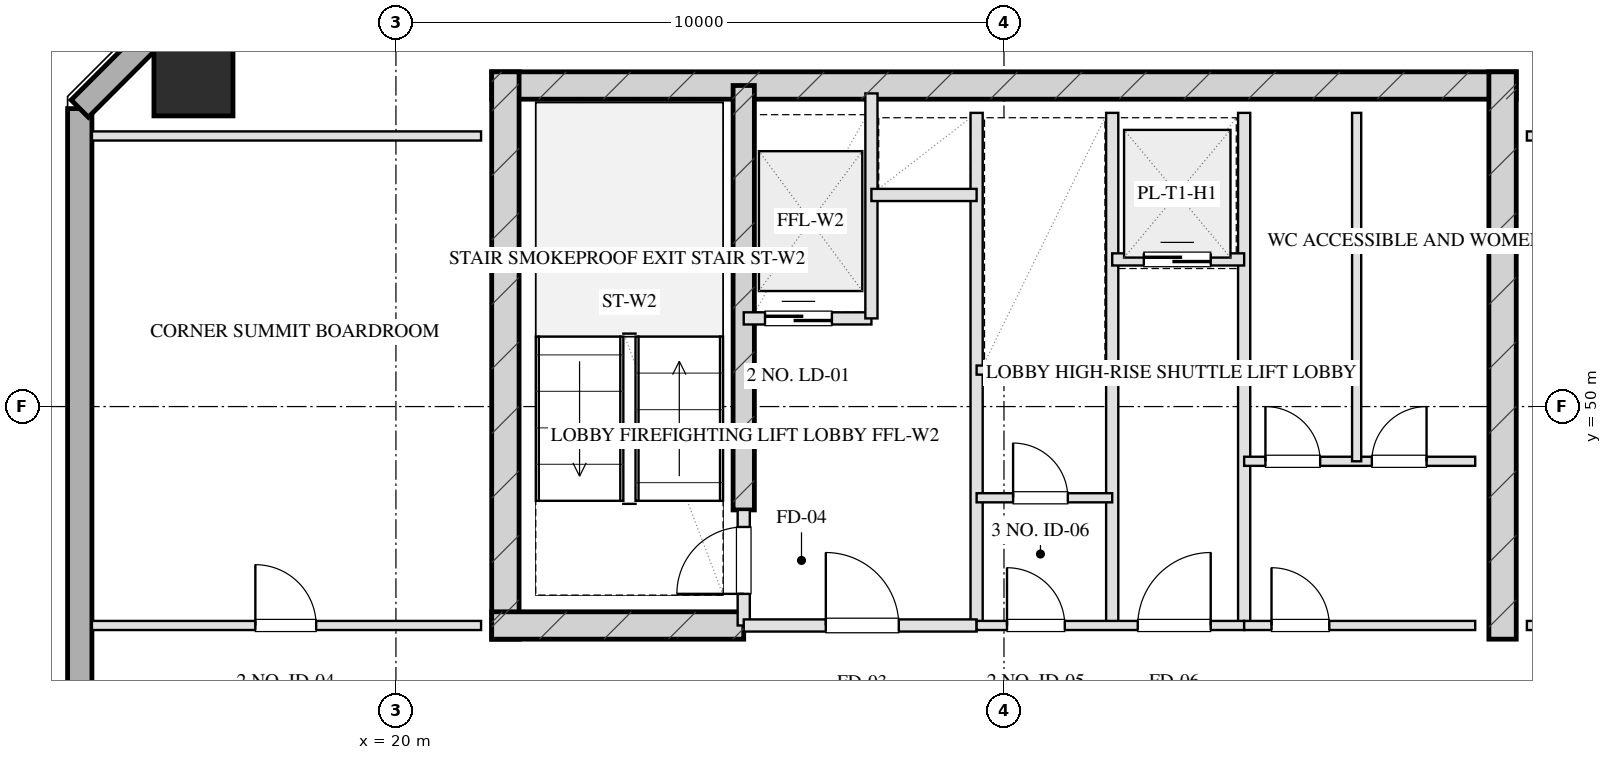
"""IFC4 building model, lengths in metres.
Left out: names, types, materials, properties, quantities, classifications, styles, units other than length and angle.
Written with IfcOpenShell. Run it as: python <this file> out.ifc"""

import sys

from ifc_helpers import new_model, si_unit, direction, frame, frame_2d, origin, origin_2d, place, context, subcontext, project, spatial, rectangle, hollow_rectangle, extrude, element, fill, save


model = new_model("IFC4")
c1 = context("Model", 3, precision=1e-05, world=origin(), true_north=direction((0.0, 1.0)))
c2 = subcontext(c1, "Body", "Model", "MODEL_VIEW")
j1 = project(units=[si_unit("LENGTHUNIT", "METRE"), si_unit("PLANEANGLEUNIT", "RADIAN")], contexts=[c1])
p1 = place(None, origin())
s1 = spatial("IfcSite", under=j1, at=p1, CompositionType="ELEMENT")
p2 = place(p1, origin())
s2 = spatial("IfcBuilding", under=s1, at=p2, CompositionType="ELEMENT")
p3 = place(p2, frame((0.0, 0.0, 272.8)))
s3 = spatial("IfcBuildingStorey", under=s2, at=p3, CompositionType="ELEMENT", Elevation=272.8)
p4 = place(p3, frame((21.575, 55.28, 0.0), z_axis=(0.0, 0.0, 1.0), x_axis=(1.0, 0.0, 0.0)))
e1 = element("IfcWall", 1, at=p4, inside=s3, PredefinedType="SHEAR", context=c2, shape_type="SweptSolid", body=[
    extrude(rectangle(XDim=16.85, YDim=0.45, at=frame_2d((8.425, 0.0))), origin(), (0.0, 0.0, 1.0), 3.2),
])
for number, where, z_axis, x_axis in (
    (2, (21.8, 46.175, 0.0), (0.0, 0.0, 1.0), (0.0, 1.0, 0.0)),
    (3, (38.2, 46.175, 0.0), (0.0, 0.0, 1.0), (0.0, 1.0, 0.0)),
):
    element("IfcWall", number, at=place(p3, frame(where, z_axis=z_axis, x_axis=x_axis)), inside=s3, PredefinedType="SHEAR", context=c2, shape_type="SweptSolid", body=[
        extrude(rectangle(XDim=9.33, YDim=0.45, at=frame_2d((4.665, 0.0))), origin(), (0.0, 0.0, 1.0), 3.2),
    ])
p5 = place(p3, frame((25.72, 48.3, 0.0), z_axis=(0.0, 0.0, 1.0), x_axis=(0.0, 1.0, 0.0)))
e4 = element("IfcWall", 4, at=p5, inside=s3, PredefinedType="SHEAR", context=c2, shape_type="SweptSolid", body=[
    extrude(rectangle(XDim=6.98, YDim=0.35, at=frame_2d((3.49, 0.0))), origin(), (0.0, 0.0, 1.0), 3.2),
])
p6 = place(p3, frame((21.575, 46.4, 0.0), z_axis=(0.0, 0.0, 1.0), x_axis=(1.0, 0.0, 0.0)))
e5 = element("IfcWall", 5, at=p6, inside=s3, PredefinedType="SHEAR", context=c2, shape_type="SweptSolid", body=[
    extrude(rectangle(XDim=4.145, YDim=0.45, at=frame_2d((2.073, 0.0))), origin(), (0.0, 0.0, 1.0), 3.2),
])
p7 = place(p3, frame((16.67, 55.43, 0.0), z_axis=(0.0, 0.0, 1.0), x_axis=(1.0, 0.0, 0.0)))
e6 = element("IfcColumn", 6, at=p7, inside=s3, PredefinedType="COLUMN", context=c2, shape_type="SweptSolid", body=[
    extrude(hollow_rectangle(XDim=1.3, YDim=1.3, WallThickness=0.045, at=origin_2d()), origin(), (0.0, 0.0, 1.0), 3.201),
])
p8 = place(p3, frame((14.8, 13.1, 0.0), z_axis=(0.0, 0.0, 1.0), x_axis=(0.0, 1.0, 0.0)))
e7 = element("IfcWall", 7, at=p8, inside=s3, PredefinedType="SOLIDWALL", context=c2, shape_type="SweptSolid", body=[
    extrude(rectangle(XDim=41.8, YDim=0.4, at=frame_2d((20.9, 0.0))), origin(), (0.0, 0.0, 1.0), 2.36),
])
p9 = place(p8, frame((13.525, 0.0, 0.75)))
e8 = element("IfcOpeningElement", 8, at=p9, cuts=e7, PredefinedType="OPENING", context=c2, shape_type="SweptSolid", body=[
    extrude(rectangle(XDim=1.95, YDim=1.21, at=frame_2d((0.975, 0.605))), frame((0.0, 0.21, 0.0), z_axis=(0.0, -1.0, 0.0), x_axis=(1.0, 0.0, 0.0)), (0.0, 0.0, 1.0), 0.42),
])
p10 = place(p8, frame((17.325, 0.0, 0.75)))
e9 = element("IfcOpeningElement", 9, at=p10, cuts=e7, PredefinedType="OPENING", context=c2, shape_type="SweptSolid", body=[
    extrude(rectangle(XDim=1.95, YDim=1.21, at=frame_2d((0.975, 0.605))), frame((0.0, 0.21, 0.0), z_axis=(0.0, -1.0, 0.0), x_axis=(1.0, 0.0, 0.0)), (0.0, 0.0, 1.0), 0.42),
])
p11 = place(p8, frame((22.525, 0.0, 0.75)))
e10 = element("IfcOpeningElement", 10, at=p11, cuts=e7, PredefinedType="OPENING", context=c2, shape_type="SweptSolid", body=[
    extrude(rectangle(XDim=1.95, YDim=1.21, at=frame_2d((0.975, 0.605))), frame((0.0, 0.21, 0.0), z_axis=(0.0, -1.0, 0.0), x_axis=(1.0, 0.0, 0.0)), (0.0, 0.0, 1.0), 0.42),
])
p12 = place(p8, frame((26.325, 0.0, 0.75)))
e11 = element("IfcOpeningElement", 11, at=p12, cuts=e7, PredefinedType="OPENING", context=c2, shape_type="SweptSolid", body=[
    extrude(rectangle(XDim=1.95, YDim=1.21, at=frame_2d((0.975, 0.605))), frame((0.0, 0.21, 0.0), z_axis=(0.0, -1.0, 0.0), x_axis=(1.0, 0.0, 0.0)), (0.0, 0.0, 1.0), 0.42),
])
p13 = place(p3, frame((14.8, 54.9, 0.0), z_axis=(0.0, 0.0, 1.0), x_axis=(0.707070815327, 0.707142745217, 0.0)))
e12 = element("IfcWall", 12, at=p13, inside=s3, PredefinedType="SOLIDWALL", context=c2, shape_type="SweptSolid", body=[
    extrude(rectangle(XDim=3.394, YDim=0.4, at=frame_2d((1.697, 0.0))), origin(), (0.0, 0.0, 1.0), 2.36),
])
p14 = place(p3, frame((25.72, 46.4, 0.0), z_axis=(0.0, 0.0, 1.0), x_axis=(0.0, 1.0, 0.0)))
e13 = element("IfcWall", 13, at=p14, inside=s3, PredefinedType="PARTITIONING", context=c2, shape_type="SweptSolid", body=[
    extrude(rectangle(XDim=1.9, YDim=0.2, at=frame_2d((0.95, 0.0))), origin(), (0.0, 0.0, 1.0), 2.925),
])
p15 = place(p14, frame((0.52, 0.0, 0.0)))
e14 = element("IfcOpeningElement", 14, at=p15, cuts=e13, PredefinedType="OPENING", context=c2, shape_type="SweptSolid", body=[
    extrude(rectangle(XDim=1.1, YDim=2.05, at=frame_2d((0.55, 1.025))), frame((0.0, 0.11, 0.0), z_axis=(0.0, -1.0, 0.0), x_axis=(1.0, 0.0, 0.0)), (0.0, 0.0, 1.0), 0.22),
])
p16 = place(p3, frame((29.55, 46.4, 0.0), z_axis=(0.0, 0.0, 1.0), x_axis=(0.0, 1.0, 0.0)))
e15 = element("IfcWall", 15, at=p16, inside=s3, PredefinedType="PARTITIONING", context=c2, shape_type="SweptSolid", body=[
    extrude(rectangle(XDim=8.43, YDim=0.2, at=frame_2d((4.215, 0.0))), origin(), (0.0, 0.0, 1.0), 2.925),
])
p17 = place(p3, frame((25.72, 46.4, 0.0), z_axis=(0.0, 0.0, 1.0), x_axis=(1.0, 0.0, 0.0)))
e16 = element("IfcWall", 16, at=p17, inside=s3, PredefinedType="PARTITIONING", context=c2, shape_type="SweptSolid", body=[
    extrude(rectangle(XDim=3.83, YDim=0.2, at=frame_2d((1.915, 0.0))), origin(), (0.0, 0.0, 1.0), 2.925),
])
p18 = place(p17, frame((1.35, 0.0, 0.0)))
e17 = element("IfcOpeningElement", 17, at=p18, cuts=e16, PredefinedType="OPENING", context=c2, shape_type="SweptSolid", body=[
    extrude(rectangle(XDim=1.2, YDim=2.05, at=frame_2d((0.6, 1.025))), frame((0.0, 0.11, 0.0), z_axis=(0.0, -1.0, 0.0), x_axis=(1.0, 0.0, 0.0)), (0.0, 0.0, 1.0), 0.22),
])
p19 = place(p3, frame((25.72, 51.45, 0.0), z_axis=(0.0, 0.0, 1.0), x_axis=(1.0, 0.0, 0.0)))
e18 = element("IfcWall", 18, at=p19, inside=s3, PredefinedType="PARTITIONING", context=c2, shape_type="SweptSolid", body=[
    extrude(rectangle(XDim=2.1, YDim=0.2, at=frame_2d((1.05, 0.0))), origin(), (0.0, 0.0, 1.0), 2.925),
])
p20 = place(p19, frame((0.35, 0.0, 0.0)))
e19 = element("IfcOpeningElement", 19, at=p20, cuts=e18, PredefinedType="OPENING", context=c2, shape_type="SweptSolid", body=[
    extrude(rectangle(XDim=1.1, YDim=2.05, at=frame_2d((0.55, 1.025))), frame((0.0, 0.11, 0.0), z_axis=(0.0, -1.0, 0.0), x_axis=(1.0, 0.0, 0.0)), (0.0, 0.0, 1.0), 0.22),
])
p21 = place(p3, frame((27.82, 51.45, 0.0), z_axis=(0.0, 0.0, 1.0), x_axis=(0.0, 1.0, 0.0)))
e20 = element("IfcWall", 20, at=p21, inside=s3, PredefinedType="PARTITIONING", context=c2, shape_type="SweptSolid", body=[
    extrude(rectangle(XDim=3.7, YDim=0.2, at=frame_2d((1.85, 0.0))), origin(), (0.0, 0.0, 1.0), 2.925),
])
p22 = place(p3, frame((27.82, 53.48, 0.0), z_axis=(0.0, 0.0, 1.0), x_axis=(1.0, 0.0, 0.0)))
e21 = element("IfcWall", 21, at=p22, inside=s3, PredefinedType="PARTITIONING", context=c2, shape_type="SweptSolid", body=[
    extrude(rectangle(XDim=1.73, YDim=0.2, at=frame_2d((0.865, 0.0))), origin(), (0.0, 0.0, 1.0), 2.925),
])
for number, where, z_axis, x_axis in (
    (22, (33.95, 46.4, 0.0), (0.0, 0.0, 1.0), (0.0, 1.0, 0.0)),
    (23, (31.78, 46.4, 0.0), (0.0, 0.0, 1.0), (0.0, 1.0, 0.0)),
):
    element("IfcWall", number, at=place(p3, frame(where, z_axis=z_axis, x_axis=x_axis)), inside=s3, PredefinedType="PARTITIONING", context=c2, shape_type="SweptSolid", body=[
        extrude(rectangle(XDim=8.43, YDim=0.2, at=frame_2d((4.215, 0.0))), origin(), (0.0, 0.0, 1.0), 2.925),
    ])
p23 = place(p3, frame((29.55, 46.4, 0.0), z_axis=(0.0, 0.0, 1.0), x_axis=(1.0, 0.0, 0.0)))
e24 = element("IfcWall", 24, at=p23, inside=s3, PredefinedType="PARTITIONING", context=c2, shape_type="SweptSolid", body=[
    extrude(rectangle(XDim=4.4, YDim=0.15, at=frame_2d((2.2, 0.0))), origin(), (0.0, 0.0, 1.0), 2.925),
])
p24 = place(p23, frame((0.5, 0.0, 0.0)))
e25 = element("IfcOpeningElement", 25, at=p24, cuts=e24, PredefinedType="OPENING", context=c2, shape_type="SweptSolid", body=[
    extrude(rectangle(XDim=0.95, YDim=2.05, at=frame_2d((0.475, 1.025))), frame((0.0, 0.085, 0.0), z_axis=(0.0, -1.0, 0.0), x_axis=(1.0, 0.0, 0.0)), (0.0, 0.0, 1.0), 0.17),
])
p25 = place(p23, frame((2.65, 0.0, 0.0)))
e26 = element("IfcOpeningElement", 26, at=p25, cuts=e24, PredefinedType="OPENING", context=c2, shape_type="SweptSolid", body=[
    extrude(rectangle(XDim=1.2, YDim=2.05, at=frame_2d((0.6, 1.025))), frame((0.0, 0.085, 0.0), z_axis=(0.0, -1.0, 0.0), x_axis=(1.0, 0.0, 0.0)), (0.0, 0.0, 1.0), 0.17),
])
p26 = place(p3, frame((29.55, 50.6, 0.0), z_axis=(0.0, 0.0, 1.0), x_axis=(1.0, 0.0, 0.0)))
e27 = element("IfcWall", 27, at=p26, inside=s3, PredefinedType="PARTITIONING", context=c2, shape_type="SweptSolid", body=[
    extrude(rectangle(XDim=2.23, YDim=0.15, at=frame_2d((1.115, 0.0))), origin(), (0.0, 0.0, 1.0), 2.925),
])
p27 = place(p3, frame((29.55, 48.5, 0.0), z_axis=(0.0, 0.0, 1.0), x_axis=(1.0, 0.0, 0.0)))
e28 = element("IfcWall", 28, at=p27, inside=s3, PredefinedType="PARTITIONING", context=c2, shape_type="SweptSolid", body=[
    extrude(rectangle(XDim=2.23, YDim=0.15, at=frame_2d((1.115, 0.0))), origin(), (0.0, 0.0, 1.0), 2.925),
])
p28 = place(p27, frame((0.6, 0.0, 0.0)))
e29 = element("IfcOpeningElement", 29, at=p28, cuts=e28, PredefinedType="OPENING", context=c2, shape_type="SweptSolid", body=[
    extrude(rectangle(XDim=0.9, YDim=2.05, at=frame_2d((0.45, 1.025))), frame((0.0, 0.085, 0.0), z_axis=(0.0, -1.0, 0.0), x_axis=(1.0, 0.0, 0.0)), (0.0, 0.0, 1.0), 0.17),
])
p29 = place(p3, frame((31.78, 52.42, 0.0), z_axis=(0.0, 0.0, 1.0), x_axis=(1.0, 0.0, 0.0)))
e30 = element("IfcWall", 30, at=p29, inside=s3, PredefinedType="PARTITIONING", context=c2, shape_type="SweptSolid", body=[
    extrude(rectangle(XDim=2.17, YDim=0.2, at=frame_2d((1.085, 0.0))), origin(), (0.0, 0.0, 1.0), 2.925),
])
p30 = place(p29, frame((0.52, 0.0, 0.0)))
e31 = element("IfcOpeningElement", 31, at=p30, cuts=e30, PredefinedType="OPENING", context=c2, shape_type="SweptSolid", body=[
    extrude(rectangle(XDim=1.1, YDim=2.05, at=frame_2d((0.55, 1.025))), frame((0.0, 0.11, 0.0), z_axis=(0.0, -1.0, 0.0), x_axis=(1.0, 0.0, 0.0)), (0.0, 0.0, 1.0), 0.22),
])
p31 = place(p3, frame((33.95, 46.4, 0.0), z_axis=(0.0, 0.0, 1.0), x_axis=(1.0, 0.0, 0.0)))
e32 = element("IfcWall", 32, at=p31, inside=s3, PredefinedType="PARTITIONING", context=c2, shape_type="SweptSolid", body=[
    extrude(rectangle(XDim=3.8, YDim=0.15, at=frame_2d((1.9, 0.0))), origin(), (0.0, 0.0, 1.0), 2.925),
])
p32 = place(p31, frame((0.45, 0.0, 0.0)))
e33 = element("IfcOpeningElement", 33, at=p32, cuts=e32, PredefinedType="OPENING", context=c2, shape_type="SweptSolid", body=[
    extrude(rectangle(XDim=0.95, YDim=2.05, at=frame_2d((0.475, 1.025))), frame((0.0, 0.085, 0.0), z_axis=(0.0, -1.0, 0.0), x_axis=(1.0, 0.0, 0.0)), (0.0, 0.0, 1.0), 0.17),
])
p33 = place(p3, frame((33.95, 49.1, 0.0), z_axis=(0.0, 0.0, 1.0), x_axis=(1.0, 0.0, 0.0)))
e34 = element("IfcWall", 34, at=p33, inside=s3, PredefinedType="PARTITIONING", context=c2, shape_type="SweptSolid", body=[
    extrude(rectangle(XDim=3.8, YDim=0.15, at=frame_2d((1.9, 0.0))), origin(), (0.0, 0.0, 1.0), 2.925),
])
p34 = place(p33, frame((0.35, 0.0, 0.0)))
e35 = element("IfcOpeningElement", 35, at=p34, cuts=e34, PredefinedType="OPENING", context=c2, shape_type="SweptSolid", body=[
    extrude(rectangle(XDim=0.9, YDim=2.05, at=frame_2d((0.45, 1.025))), frame((0.0, 0.085, 0.0), z_axis=(0.0, -1.0, 0.0), x_axis=(1.0, 0.0, 0.0)), (0.0, 0.0, 1.0), 0.17),
])
p35 = place(p33, frame((2.1, 0.0, 0.0)))
e36 = element("IfcOpeningElement", 36, at=p35, cuts=e34, PredefinedType="OPENING", context=c2, shape_type="SweptSolid", body=[
    extrude(rectangle(XDim=0.9, YDim=2.05, at=frame_2d((0.45, 1.025))), frame((0.0, 0.085, 0.0), z_axis=(0.0, -1.0, 0.0), x_axis=(1.0, 0.0, 0.0)), (0.0, 0.0, 1.0), 0.17),
])
p36 = place(p3, frame((35.8, 49.1, 0.0), z_axis=(0.0, 0.0, 1.0), x_axis=(0.0, 1.0, 0.0)))
e37 = element("IfcWall", 37, at=p36, inside=s3, PredefinedType="PARTITIONING", context=c2, shape_type="SweptSolid", body=[
    extrude(rectangle(XDim=5.73, YDim=0.15, at=frame_2d((2.865, 0.0))), origin(), (0.0, 0.0, 1.0), 2.925),
])
p37 = place(p3, frame((15.0, 54.45, 0.0), z_axis=(0.0, 0.0, 1.0), x_axis=(1.0, 0.0, 0.0)))
e38 = element("IfcWall", 38, at=p37, inside=s3, PredefinedType="PARTITIONING", context=c2, shape_type="SweptSolid", body=[
    extrude(rectangle(XDim=6.4, YDim=0.15, at=frame_2d((3.2, 0.0))), origin(), (0.0, 0.0, 1.0), 2.925),
])
p38 = place(p3, frame((15.0, 46.4, 0.0), z_axis=(0.0, 0.0, 1.0), x_axis=(1.0, 0.0, 0.0)))
e39 = element("IfcWall", 39, at=p38, inside=s3, PredefinedType="PARTITIONING", context=c2, shape_type="SweptSolid", body=[
    extrude(rectangle(XDim=6.4, YDim=0.15, at=frame_2d((3.2, 0.0))), origin(), (0.0, 0.0, 1.0), 2.925),
])
p39 = place(p38, frame((2.688, 0.0, 0.0)))
e40 = element("IfcOpeningElement", 40, at=p39, cuts=e39, PredefinedType="OPENING", context=c2, shape_type="SweptSolid", body=[
    extrude(rectangle(XDim=1.0, YDim=2.05, at=frame_2d((0.5, 1.025))), frame((0.0, 0.085, 0.0), z_axis=(0.0, -1.0, 0.0), x_axis=(1.0, 0.0, 0.0)), (0.0, 0.0, 1.0), 0.17),
])
p40 = place(p3, frame((38.6, 54.45, 0.0), z_axis=(0.0, 0.0, 1.0), x_axis=(1.0, 0.0, 0.0)))
e41 = element("IfcWall", 41, at=p40, inside=s3, PredefinedType="PARTITIONING", context=c2, shape_type="SweptSolid", body=[
    extrude(rectangle(XDim=6.4, YDim=0.15, at=frame_2d((3.2, 0.0))), origin(), (0.0, 0.0, 1.0), 2.925),
])
p41 = place(p3, frame((38.6, 46.4, 0.0), z_axis=(0.0, 0.0, 1.0), x_axis=(1.0, 0.0, 0.0)))
e42 = element("IfcWall", 42, at=p41, inside=s3, PredefinedType="PARTITIONING", context=c2, shape_type="SweptSolid", body=[
    extrude(rectangle(XDim=6.4, YDim=0.15, at=frame_2d((3.2, 0.0))), origin(), (0.0, 0.0, 1.0), 2.925),
])
p42 = place(p41, frame((2.688, 0.0, 0.0)))
e43 = element("IfcOpeningElement", 43, at=p42, cuts=e42, PredefinedType="OPENING", context=c2, shape_type="SweptSolid", body=[
    extrude(rectangle(XDim=1.0, YDim=2.05, at=frame_2d((0.5, 1.025))), frame((0.0, 0.085, 0.0), z_axis=(0.0, -1.0, 0.0), x_axis=(1.0, 0.0, 0.0)), (0.0, 0.0, 1.0), 0.17),
])
p43 = place(p15, origin())
e44 = element("IfcDoor", 44, at=p43, inside=s3, OperationType="SINGLE_SWING_LEFT", PredefinedType="DOOR", context=c2, shape_type="SweptSolid", body=[
    extrude(rectangle(XDim=1.1, YDim=2.05, at=frame_2d((0.55, 1.025))), frame((0.0, 0.025, 0.0), z_axis=(0.0, -1.0, 0.0), x_axis=(1.0, 0.0, 0.0)), (0.0, 0.0, 1.0), 0.05),
])
fill(e14, e44)
p44 = place(p18, origin())
e45 = element("IfcDoor", 45, at=p44, inside=s3, OperationType="SINGLE_SWING_LEFT", PredefinedType="DOOR", context=c2, shape_type="SweptSolid", body=[
    extrude(rectangle(XDim=1.2, YDim=2.05, at=frame_2d((0.6, 1.025))), frame((0.0, 0.025, 0.0), z_axis=(0.0, -1.0, 0.0), x_axis=(1.0, 0.0, 0.0)), (0.0, 0.0, 1.0), 0.05),
])
fill(e17, e45)
p45 = place(p20, origin())
e46 = element("IfcDoor", 46, at=p45, inside=s3, OperationType="DOUBLE_DOOR_SLIDING", PredefinedType="DOOR", context=c2, shape_type="SweptSolid", body=[
    extrude(rectangle(XDim=1.1, YDim=2.05, at=frame_2d((0.55, 1.025))), frame((0.0, 0.025, 0.0), z_axis=(0.0, -1.0, 0.0), x_axis=(1.0, 0.0, 0.0)), (0.0, 0.0, 1.0), 0.05),
])
fill(e19, e46)
p46 = place(p24, origin())
e47 = element("IfcDoor", 47, at=p46, inside=s3, OperationType="SINGLE_SWING_LEFT", PredefinedType="DOOR", context=c2, shape_type="SweptSolid", body=[
    extrude(rectangle(XDim=0.95, YDim=2.05, at=frame_2d((0.475, 1.025))), frame((0.0, 0.025, 0.0), z_axis=(0.0, -1.0, 0.0), x_axis=(1.0, 0.0, 0.0)), (0.0, 0.0, 1.0), 0.05),
])
fill(e25, e47)
p47 = place(p25, origin())
e48 = element("IfcDoor", 48, at=p47, inside=s3, OperationType="SINGLE_SWING_RIGHT", PredefinedType="DOOR", context=c2, shape_type="SweptSolid", body=[
    extrude(rectangle(XDim=1.2, YDim=2.05, at=frame_2d((0.6, 1.025))), frame((0.0, 0.025, 0.0), z_axis=(0.0, -1.0, 0.0), x_axis=(1.0, 0.0, 0.0)), (0.0, 0.0, 1.0), 0.05),
])
fill(e26, e48)
p48 = place(p28, origin())
e49 = element("IfcDoor", 49, at=p48, inside=s3, OperationType="SINGLE_SWING_LEFT", PredefinedType="DOOR", context=c2, shape_type="SweptSolid", body=[
    extrude(rectangle(XDim=0.9, YDim=2.05, at=frame_2d((0.45, 1.025))), frame((0.0, 0.025, 0.0), z_axis=(0.0, -1.0, 0.0), x_axis=(1.0, 0.0, 0.0)), (0.0, 0.0, 1.0), 0.05),
])
fill(e29, e49)
p49 = place(p30, origin())
e50 = element("IfcDoor", 50, at=p49, inside=s3, OperationType="DOUBLE_DOOR_SLIDING", PredefinedType="DOOR", context=c2, shape_type="SweptSolid", body=[
    extrude(rectangle(XDim=1.1, YDim=2.05, at=frame_2d((0.55, 1.025))), frame((0.0, 0.025, 0.0), z_axis=(0.0, -1.0, 0.0), x_axis=(1.0, 0.0, 0.0)), (0.0, 0.0, 1.0), 0.05),
])
fill(e31, e50)
p50 = place(p32, origin())
e51 = element("IfcDoor", 51, at=p50, inside=s3, OperationType="SINGLE_SWING_LEFT", PredefinedType="DOOR", context=c2, shape_type="SweptSolid", body=[
    extrude(rectangle(XDim=0.95, YDim=2.05, at=frame_2d((0.475, 1.025))), frame((0.0, 0.025, 0.0), z_axis=(0.0, -1.0, 0.0), x_axis=(1.0, 0.0, 0.0)), (0.0, 0.0, 1.0), 0.05),
])
fill(e33, e51)
p51 = place(p34, origin())
e52 = element("IfcDoor", 52, at=p51, inside=s3, OperationType="SINGLE_SWING_LEFT", PredefinedType="DOOR", context=c2, shape_type="SweptSolid", body=[
    extrude(rectangle(XDim=0.9, YDim=2.05, at=frame_2d((0.45, 1.025))), frame((0.0, 0.025, 0.0), z_axis=(0.0, -1.0, 0.0), x_axis=(1.0, 0.0, 0.0)), (0.0, 0.0, 1.0), 0.05),
])
fill(e35, e52)
p52 = place(p35, origin())
e53 = element("IfcDoor", 53, at=p52, inside=s3, OperationType="SINGLE_SWING_RIGHT", PredefinedType="DOOR", context=c2, shape_type="SweptSolid", body=[
    extrude(rectangle(XDim=0.9, YDim=2.05, at=frame_2d((0.45, 1.025))), frame((0.0, 0.025, 0.0), z_axis=(0.0, -1.0, 0.0), x_axis=(1.0, 0.0, 0.0)), (0.0, 0.0, 1.0), 0.05),
])
fill(e36, e53)
p53 = place(p39, origin())
e54 = element("IfcDoor", 54, at=p53, inside=s3, OperationType="SINGLE_SWING_LEFT", PredefinedType="DOOR", context=c2, shape_type="SweptSolid", body=[
    extrude(rectangle(XDim=1.0, YDim=2.05, at=frame_2d((0.5, 1.025))), frame((0.0, 0.025, 0.0), z_axis=(0.0, -1.0, 0.0), x_axis=(1.0, 0.0, 0.0)), (0.0, 0.0, 1.0), 0.05),
])
fill(e40, e54)
save(model, sys.argv[1])
